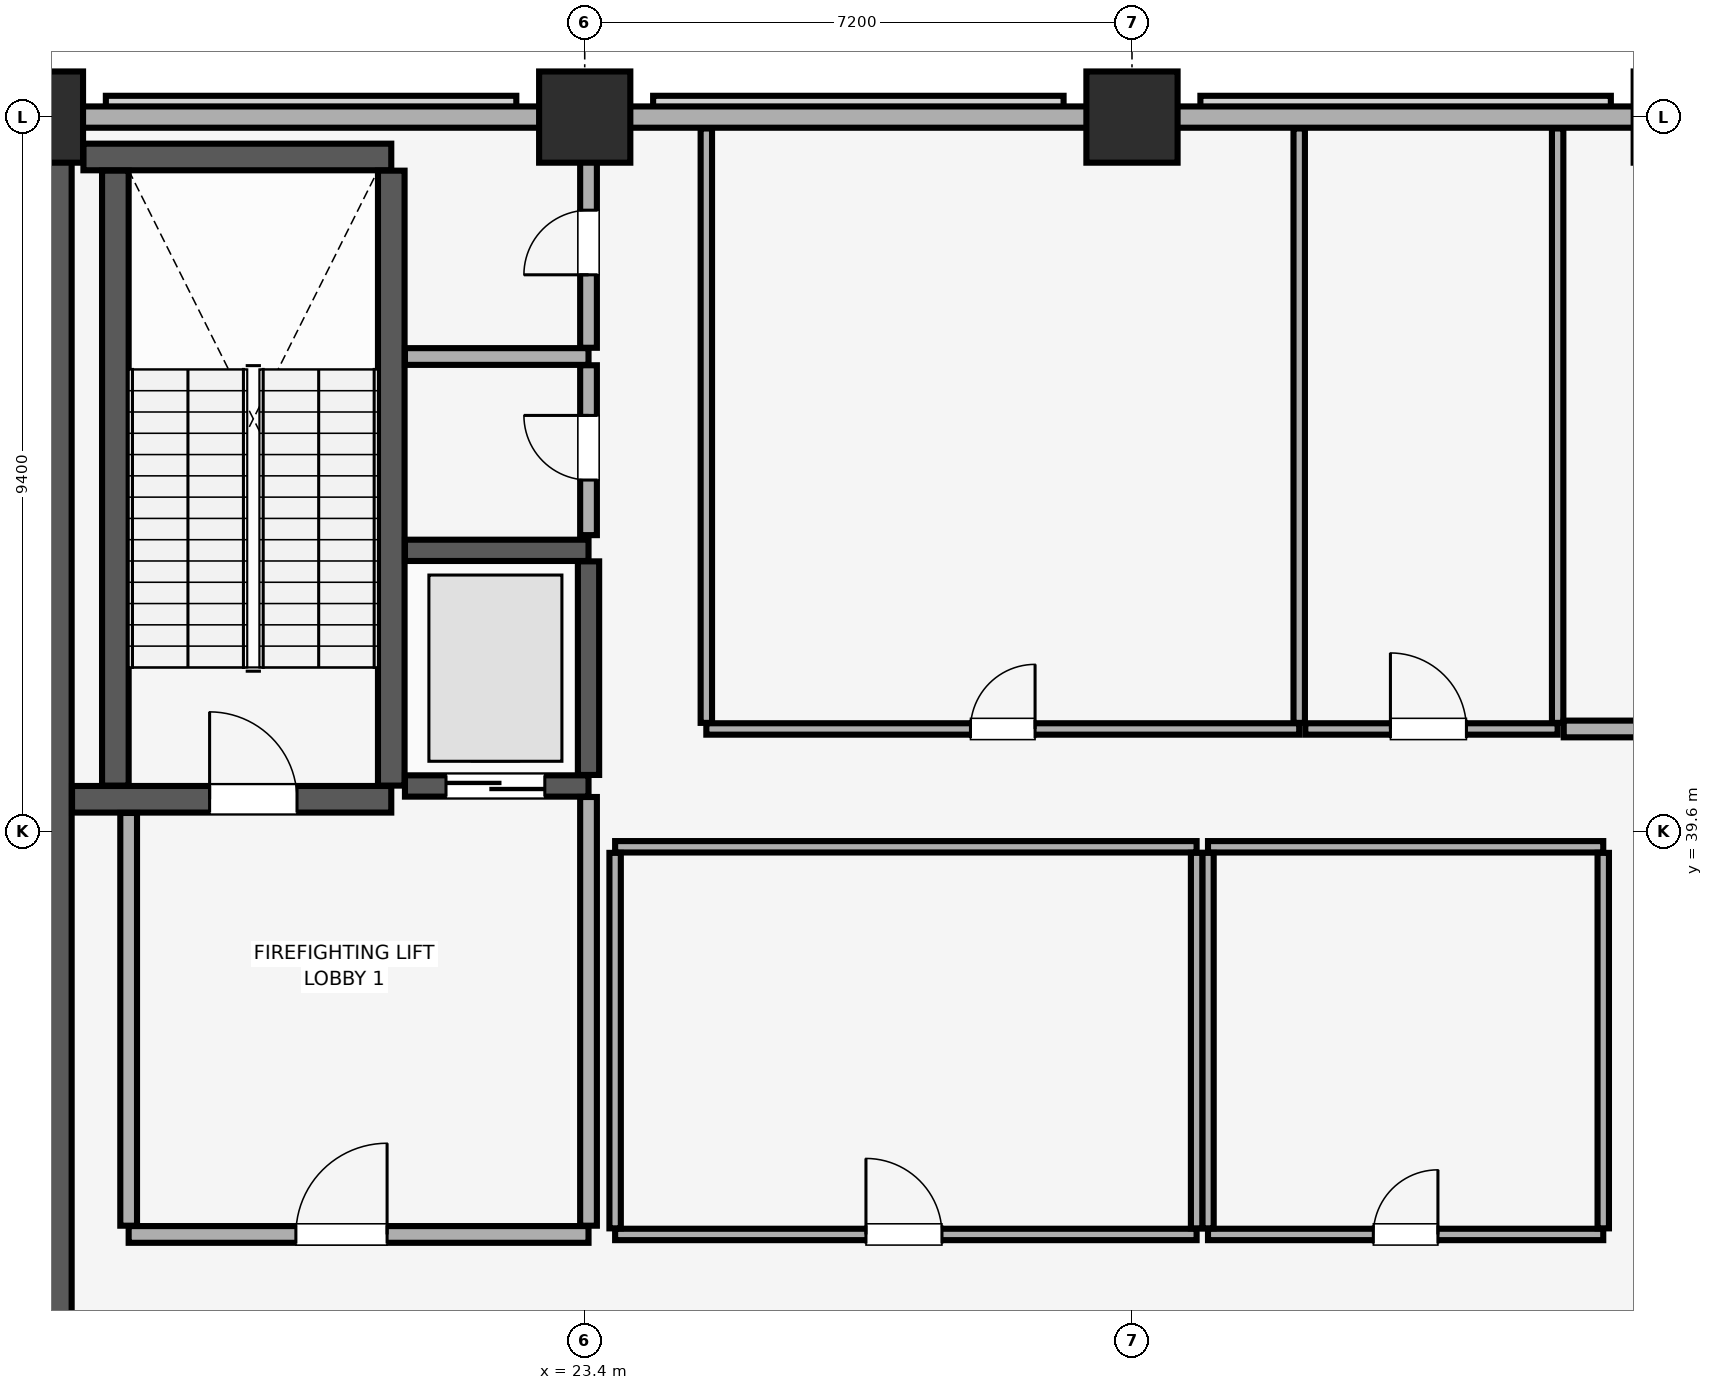
"""IFC4 building model, lengths in metres.
Left out: names, types, materials, properties, quantities, classifications, styles, units other than length and angle.
Written with IfcOpenShell. Run it as: python <this file> out.ifc"""

import sys

from ifc_helpers import new_model, si_unit, direction, frame, frame_2d, origin, origin_2d, place, context, subcontext, project, spatial, rectangle, extrude, element, fill, save


model = new_model("IFC4")
c1 = context("Model", 3, precision=1e-05, world=origin(), true_north=direction((0.0, 1.0)))
c2 = subcontext(c1, "Body", "Model", "MODEL_VIEW")
j1 = project(units=[si_unit("LENGTHUNIT", "METRE"), si_unit("PLANEANGLEUNIT", "RADIAN")], contexts=[c1])
p1 = place(None, origin())
s1 = spatial("IfcSite", under=j1, at=p1, CompositionType="ELEMENT")
p2 = place(p1, origin())
s2 = spatial("IfcBuilding", under=s1, at=p2, CompositionType="ELEMENT")
p3 = place(p2, frame((0.0, 0.0, 184.75)))
s3 = spatial("IfcBuildingStorey", under=s2, at=p3, CompositionType="ELEMENT", Elevation=184.75)
for number, where, z_axis, x_axis in (
    (1, (16.2, 49.0, 0.0), (0.0, 0.0, 1.0), (1.0, 0.0, 0.0)),
    (2, (23.4, 49.0, 0.0), (0.0, 0.0, 1.0), (1.0, 0.0, 0.0)),
    (3, (30.6, 49.0, 0.0), (0.0, 0.0, 1.0), (1.0, 0.0, 0.0)),
):
    element("IfcColumn", number, at=place(p3, frame(where, z_axis=z_axis, x_axis=x_axis)), inside=s3, PredefinedType="COLUMN", context=c2, shape_type="SweptSolid", body=[
        extrude(rectangle(XDim=1.2, YDim=1.2, at=origin_2d()), origin(), (0.0, 0.0, 1.0), 5.16),
    ])
p4 = place(p3, frame((77.0, 49.0, 0.0), z_axis=(0.0, 0.0, 1.0), x_axis=(-1.0, 0.0, 0.0)))
e4 = element("IfcWall", 4, at=p4, inside=s3, PredefinedType="SOLIDWALL", context=c2, shape_type="SweptSolid", body=[
    extrude(rectangle(XDim=70.0, YDim=0.28, at=frame_2d((35.0, 0.0))), origin(), (0.0, 0.0, 1.0), 4.36),
])
p5 = place(p3, frame((16.2, 29.4, 0.0), z_axis=(0.0, 0.0, 1.0), x_axis=(0.0, 1.0, 0.0)))
e5 = element("IfcWall", 5, at=p5, inside=s3, PredefinedType="SHEAR", context=c2, shape_type="SweptSolid", body=[
    extrude(rectangle(XDim=19.2, YDim=0.9, at=frame_2d((9.6, 0.0))), origin(), (0.0, 0.0, 1.0), 5.16),
])
p6 = place(p3, frame((16.655, 40.025, 0.0), z_axis=(0.0, 0.0, 1.0), x_axis=(1.0, 0.0, 0.0)))
e6 = element("IfcWall", 6, at=p6, inside=s3, PredefinedType="SHEAR", context=c2, shape_type="SweptSolid", body=[
    extrude(rectangle(XDim=4.2, YDim=0.35, at=frame_2d((2.1, 0.0))), origin(), (0.0, 0.0, 1.0), 5.16),
])
p7 = place(p6, frame((1.81, 0.0, 0.0)))
e7 = element("IfcOpeningElement", 7, at=p7, cuts=e6, PredefinedType="OPENING", context=c2, shape_type="SweptSolid", body=[
    extrude(rectangle(XDim=1.15, YDim=2.15, at=frame_2d((0.575, 1.075))), frame((0.0, 0.185, 0.0), z_axis=(0.0, -1.0, 0.0), x_axis=(1.0, 0.0, 0.0)), (0.0, 0.0, 1.0), 0.37),
])
p8 = place(p3, frame((16.805, 48.475, 0.0), z_axis=(0.0, 0.0, 1.0), x_axis=(1.0, 0.0, 0.0)))
e8 = element("IfcWall", 8, at=p8, inside=s3, PredefinedType="SHEAR", context=c2, shape_type="SweptSolid", body=[
    extrude(rectangle(XDim=4.05, YDim=0.35, at=frame_2d((2.025, 0.0))), origin(), (0.0, 0.0, 1.0), 5.16),
])
for number, where, z_axis, x_axis in (
    (9, (17.225, 40.205, 0.0), (0.0, 0.0, 1.0), (0.0, 1.0, 0.0)),
    (10, (20.855, 40.205, 0.0), (0.0, 0.0, 1.0), (0.0, 1.0, 0.0)),
):
    element("IfcWall", number, at=place(p3, frame(where, z_axis=z_axis, x_axis=x_axis)), inside=s3, PredefinedType="SHEAR", context=c2, shape_type="SweptSolid", body=[
        extrude(rectangle(XDim=8.09, YDim=0.35, at=frame_2d((4.045, 0.0))), origin(), (0.0, 0.0, 1.0), 5.16),
    ])
p9 = place(p3, frame((21.035, 40.2, 0.0), z_axis=(0.0, 0.0, 1.0), x_axis=(1.0, 0.0, 0.0)))
e11 = element("IfcWall", 11, at=p9, inside=s3, PredefinedType="SHEAR", context=c2, shape_type="SweptSolid", body=[
    extrude(rectangle(XDim=2.415, YDim=0.28, at=frame_2d((1.208, 0.0))), origin(), (0.0, 0.0, 1.0), 5.16),
])
p10 = place(p9, frame((0.54, 0.0, 0.0)))
e12 = element("IfcOpeningElement", 12, at=p10, cuts=e11, PredefinedType="OPENING", context=c2, shape_type="SweptSolid", body=[
    extrude(rectangle(XDim=1.3, YDim=2.3, at=frame_2d((0.65, 1.15))), frame((0.0, 0.15, 0.0), z_axis=(0.0, -1.0, 0.0), x_axis=(1.0, 0.0, 0.0)), (0.0, 0.0, 1.0), 0.3),
])
p11 = place(p3, frame((21.035, 43.3, 0.0), z_axis=(0.0, 0.0, 1.0), x_axis=(1.0, 0.0, 0.0)))
e13 = element("IfcWall", 13, at=p11, inside=s3, PredefinedType="SHEAR", context=c2, shape_type="SweptSolid", body=[
    extrude(rectangle(XDim=2.415, YDim=0.28, at=frame_2d((1.208, 0.0))), origin(), (0.0, 0.0, 1.0), 5.16),
])
p12 = place(p3, frame((23.45, 40.345, 0.0), z_axis=(0.0, 0.0, 1.0), x_axis=(0.0, 1.0, 0.0)))
e14 = element("IfcWall", 14, at=p12, inside=s3, PredefinedType="SHEAR", context=c2, shape_type="SweptSolid", body=[
    extrude(rectangle(XDim=2.81, YDim=0.28, at=frame_2d((1.405, 0.0))), origin(), (0.0, 0.0, 1.0), 5.16),
])
p13 = place(p3, frame((17.4, 34.3, 0.0), z_axis=(0.0, 0.0, 1.0), x_axis=(1.0, 0.0, 0.0)))
e15 = element("IfcWall", 15, at=p13, inside=s3, PredefinedType="PARTITIONING", context=c2, shape_type="SweptSolid", body=[
    extrude(rectangle(XDim=6.05, YDim=0.22, at=frame_2d((3.025, 0.0))), origin(), (0.0, 0.0, 1.0), 5.16),
])
p14 = place(p13, frame((2.2, 0.0, 0.0)))
e16 = element("IfcOpeningElement", 16, at=p14, cuts=e15, PredefinedType="OPENING", context=c2, shape_type="SweptSolid", body=[
    extrude(rectangle(XDim=1.2, YDim=2.15, at=frame_2d((0.6, 1.075))), frame((0.0, 0.12, 0.0), z_axis=(0.0, -1.0, 0.0), x_axis=(1.0, 0.0, 0.0)), (0.0, 0.0, 1.0), 0.24),
])
p15 = place(p3, frame((17.4, 34.415, 0.0), z_axis=(0.0, 0.0, 1.0), x_axis=(0.0, 1.0, 0.0)))
e17 = element("IfcWall", 17, at=p15, inside=s3, PredefinedType="PARTITIONING", context=c2, shape_type="SweptSolid", body=[
    extrude(rectangle(XDim=5.43, YDim=0.22, at=frame_2d((2.715, 0.0))), origin(), (0.0, 0.0, 1.0), 5.16),
])
p16 = place(p3, frame((23.45, 34.415, 0.0), z_axis=(0.0, 0.0, 1.0), x_axis=(0.0, 1.0, 0.0)))
e18 = element("IfcWall", 18, at=p16, inside=s3, PredefinedType="PARTITIONING", context=c2, shape_type="SweptSolid", body=[
    extrude(rectangle(XDim=5.64, YDim=0.22, at=frame_2d((2.82, 0.0))), origin(), (0.0, 0.0, 1.0), 5.16),
])
p17 = place(p3, frame((21.035, 45.85, 0.0), z_axis=(0.0, 0.0, 1.0), x_axis=(1.0, 0.0, 0.0)))
e19 = element("IfcWall", 19, at=p17, inside=s3, PredefinedType="PARTITIONING", context=c2, shape_type="SweptSolid", body=[
    extrude(rectangle(XDim=2.415, YDim=0.22, at=frame_2d((1.208, 0.0))), origin(), (0.0, 0.0, 1.0), 5.16),
])
p18 = place(p3, frame((23.45, 43.5, 0.0), z_axis=(0.0, 0.0, 1.0), x_axis=(0.0, 1.0, 0.0)))
e20 = element("IfcWall", 20, at=p18, inside=s3, PredefinedType="PARTITIONING", context=c2, shape_type="SweptSolid", body=[
    extrude(rectangle(XDim=2.235, YDim=0.22, at=frame_2d((1.118, 0.0))), origin(), (0.0, 0.0, 1.0), 5.16),
])
p19 = place(p18, frame((0.725, 0.0, 0.0)))
e21 = element("IfcOpeningElement", 21, at=p19, cuts=e20, PredefinedType="OPENING", context=c2, shape_type="SweptSolid", body=[
    extrude(rectangle(XDim=0.85, YDim=2.1, at=frame_2d((0.425, 1.05))), frame((0.0, 0.12, 0.0), z_axis=(0.0, -1.0, 0.0), x_axis=(1.0, 0.0, 0.0)), (0.0, 0.0, 1.0), 0.24),
])
p20 = place(p3, frame((23.45, 45.965, 0.0), z_axis=(0.0, 0.0, 1.0), x_axis=(0.0, 1.0, 0.0)))
e22 = element("IfcWall", 22, at=p20, inside=s3, PredefinedType="PARTITIONING", context=c2, shape_type="SweptSolid", body=[
    extrude(rectangle(XDim=2.885, YDim=0.22, at=frame_2d((1.442, 0.0))), origin(), (0.0, 0.0, 1.0), 5.16),
])
p21 = place(p20, frame((0.96, 0.0, 0.0)))
e23 = element("IfcOpeningElement", 23, at=p21, cuts=e22, PredefinedType="OPENING", context=c2, shape_type="SweptSolid", body=[
    extrude(rectangle(XDim=0.85, YDim=2.1, at=frame_2d((0.425, 1.05))), frame((0.0, 0.12, 0.0), z_axis=(0.0, -1.0, 0.0), x_axis=(1.0, 0.0, 0.0)), (0.0, 0.0, 1.0), 0.24),
])
p22 = place(p3, frame((31.6, 34.3, 0.0), z_axis=(0.0, 0.0, 1.0), x_axis=(1.0, 0.0, 0.0)))
e24 = element("IfcWall", 24, at=p22, inside=s3, PredefinedType="PARTITIONING", context=c2, shape_type="SweptSolid", body=[
    extrude(rectangle(XDim=5.2, YDim=0.15, at=frame_2d((2.6, 0.0))), origin(), (0.0, 0.0, 1.0), 5.16),
])
p23 = place(p22, frame((2.175, 0.0, 0.0)))
e25 = element("IfcOpeningElement", 25, at=p23, cuts=e24, PredefinedType="OPENING", context=c2, shape_type="SweptSolid", body=[
    extrude(rectangle(XDim=0.85, YDim=2.1, at=frame_2d((0.425, 1.05))), frame((0.0, 0.085, 0.0), z_axis=(0.0, -1.0, 0.0), x_axis=(1.0, 0.0, 0.0)), (0.0, 0.0, 1.0), 0.17),
])
p24 = place(p3, frame((31.6, 39.4, 0.0), z_axis=(0.0, 0.0, 1.0), x_axis=(1.0, 0.0, 0.0)))
e26 = element("IfcWall", 26, at=p24, inside=s3, PredefinedType="PARTITIONING", context=c2, shape_type="SweptSolid", body=[
    extrude(rectangle(XDim=5.2, YDim=0.15, at=frame_2d((2.6, 0.0))), origin(), (0.0, 0.0, 1.0), 5.16),
])
for number, where, z_axis, x_axis in (
    (27, (31.6, 34.38, 0.0), (0.0, 0.0, 1.0), (0.0, 1.0, 0.0)),
    (28, (36.8, 34.38, 0.0), (0.0, 0.0, 1.0), (0.0, 1.0, 0.0)),
):
    element("IfcWall", number, at=place(p3, frame(where, z_axis=z_axis, x_axis=x_axis)), inside=s3, PredefinedType="PARTITIONING", context=c2, shape_type="SweptSolid", body=[
        extrude(rectangle(XDim=4.94, YDim=0.15, at=frame_2d((2.47, 0.0))), origin(), (0.0, 0.0, 1.0), 5.16),
    ])
p25 = place(p3, frame((23.8, 34.3, 0.0), z_axis=(0.0, 0.0, 1.0), x_axis=(1.0, 0.0, 0.0)))
e29 = element("IfcWall", 29, at=p25, inside=s3, PredefinedType="PARTITIONING", context=c2, shape_type="SweptSolid", body=[
    extrude(rectangle(XDim=7.65, YDim=0.15, at=frame_2d((3.825, 0.0))), origin(), (0.0, 0.0, 1.0), 5.16),
])
p26 = place(p25, frame((3.3, 0.0, 0.0)))
e30 = element("IfcOpeningElement", 30, at=p26, cuts=e29, PredefinedType="OPENING", context=c2, shape_type="SweptSolid", body=[
    extrude(rectangle(XDim=1.0, YDim=2.15, at=frame_2d((0.5, 1.075))), frame((0.0, 0.085, 0.0), z_axis=(0.0, -1.0, 0.0), x_axis=(1.0, 0.0, 0.0)), (0.0, 0.0, 1.0), 0.17),
])
p27 = place(p3, frame((23.8, 39.4, 0.0), z_axis=(0.0, 0.0, 1.0), x_axis=(1.0, 0.0, 0.0)))
e31 = element("IfcWall", 31, at=p27, inside=s3, PredefinedType="PARTITIONING", context=c2, shape_type="SweptSolid", body=[
    extrude(rectangle(XDim=7.65, YDim=0.15, at=frame_2d((3.825, 0.0))), origin(), (0.0, 0.0, 1.0), 5.16),
])
for number, where, z_axis, x_axis in (
    (32, (23.8, 34.38, 0.0), (0.0, 0.0, 1.0), (0.0, 1.0, 0.0)),
    (33, (31.45, 34.38, 0.0), (0.0, 0.0, 1.0), (0.0, 1.0, 0.0)),
):
    element("IfcWall", number, at=place(p3, frame(where, z_axis=z_axis, x_axis=x_axis)), inside=s3, PredefinedType="PARTITIONING", context=c2, shape_type="SweptSolid", body=[
        extrude(rectangle(XDim=4.94, YDim=0.15, at=frame_2d((2.47, 0.0))), origin(), (0.0, 0.0, 1.0), 5.16),
    ])
p28 = place(p3, frame((25.0, 40.95, 0.0), z_axis=(0.0, 0.0, 1.0), x_axis=(1.0, 0.0, 0.0)))
e34 = element("IfcWall", 34, at=p28, inside=s3, PredefinedType="PARTITIONING", context=c2, shape_type="SweptSolid", body=[
    extrude(rectangle(XDim=7.8, YDim=0.15, at=frame_2d((3.9, 0.0))), origin(), (0.0, 0.0, 1.0), 5.16),
])
p29 = place(p28, frame((3.475, 0.0, 0.0)))
e35 = element("IfcOpeningElement", 35, at=p29, cuts=e34, PredefinedType="OPENING", context=c2, shape_type="SweptSolid", body=[
    extrude(rectangle(XDim=0.85, YDim=2.1, at=frame_2d((0.425, 1.05))), frame((0.0, 0.085, 0.0), z_axis=(0.0, -1.0, 0.0), x_axis=(1.0, 0.0, 0.0)), (0.0, 0.0, 1.0), 0.17),
])
for number, where, z_axis, x_axis in (
    (36, (25.0, 41.03, 0.0), (0.0, 0.0, 1.0), (0.0, 1.0, 0.0)),
    (37, (32.8, 41.03, 0.0), (0.0, 0.0, 1.0), (0.0, 1.0, 0.0)),
):
    element("IfcWall", number, at=place(p3, frame(where, z_axis=z_axis, x_axis=x_axis)), inside=s3, PredefinedType="PARTITIONING", context=c2, shape_type="SweptSolid", body=[
        extrude(rectangle(XDim=7.82, YDim=0.15, at=frame_2d((3.91, 0.0))), origin(), (0.0, 0.0, 1.0), 5.16),
    ])
p30 = place(p3, frame((32.88, 40.95, 0.0), z_axis=(0.0, 0.0, 1.0), x_axis=(1.0, 0.0, 0.0)))
e38 = element("IfcWall", 38, at=p30, inside=s3, PredefinedType="PARTITIONING", context=c2, shape_type="SweptSolid", body=[
    extrude(rectangle(XDim=3.32, YDim=0.15, at=frame_2d((1.66, 0.0))), origin(), (0.0, 0.0, 1.0), 5.16),
])
p31 = place(p30, frame((1.12, 0.0, 0.0)))
e39 = element("IfcOpeningElement", 39, at=p31, cuts=e38, PredefinedType="OPENING", context=c2, shape_type="SweptSolid", body=[
    extrude(rectangle(XDim=1.0, YDim=2.15, at=frame_2d((0.5, 1.075))), frame((0.0, 0.085, 0.0), z_axis=(0.0, -1.0, 0.0), x_axis=(1.0, 0.0, 0.0)), (0.0, 0.0, 1.0), 0.17),
])
p32 = place(p3, frame((36.2, 41.03, 0.0), z_axis=(0.0, 0.0, 1.0), x_axis=(0.0, 1.0, 0.0)))
e40 = element("IfcWall", 40, at=p32, inside=s3, PredefinedType="PARTITIONING", context=c2, shape_type="SweptSolid", body=[
    extrude(rectangle(XDim=7.82, YDim=0.15, at=frame_2d((3.91, 0.0))), origin(), (0.0, 0.0, 1.0), 5.16),
])
p33 = place(p3, frame((36.28, 40.95, 0.0), z_axis=(0.0, 0.0, 1.0), x_axis=(1.0, 0.0, 0.0)))
e41 = element("IfcWall", 41, at=p33, inside=s3, PredefinedType="PARTITIONING", context=c2, shape_type="SweptSolid", body=[
    extrude(rectangle(XDim=3.42, YDim=0.22, at=frame_2d((1.71, 0.0))), origin(), (0.0, 0.0, 1.0), 5.16),
])
p34 = place(p33, frame((2.245, 0.0, 0.0)))
e42 = element("IfcOpeningElement", 42, at=p34, cuts=e41, PredefinedType="OPENING", context=c2, shape_type="SweptSolid", body=[
    extrude(rectangle(XDim=0.85, YDim=2.1, at=frame_2d((0.425, 1.05))), frame((0.0, 0.12, 0.0), z_axis=(0.0, -1.0, 0.0), x_axis=(1.0, 0.0, 0.0)), (0.0, 0.0, 1.0), 0.24),
])
p35 = place(p7, origin())
e43 = element("IfcDoor", 43, at=p35, inside=s3, OperationType="SINGLE_SWING_LEFT", PredefinedType="DOOR", context=c2, shape_type="SweptSolid", body=[
    extrude(rectangle(XDim=1.15, YDim=2.15, at=frame_2d((0.575, 1.075))), frame((0.0, 0.025, 0.0), z_axis=(0.0, -1.0, 0.0), x_axis=(1.0, 0.0, 0.0)), (0.0, 0.0, 1.0), 0.05),
])
fill(e7, e43)
p36 = place(p10, origin())
e44 = element("IfcDoor", 44, at=p36, inside=s3, OperationType="DOUBLE_DOOR_SLIDING", PredefinedType="DOOR", context=c2, shape_type="SweptSolid", body=[
    extrude(rectangle(XDim=1.3, YDim=2.3, at=frame_2d((0.65, 1.15))), frame((0.0, 0.025, 0.0), z_axis=(0.0, -1.0, 0.0), x_axis=(1.0, 0.0, 0.0)), (0.0, 0.0, 1.0), 0.05),
])
fill(e12, e44)
p37 = place(p14, origin())
e45 = element("IfcDoor", 45, at=p37, inside=s3, OperationType="SINGLE_SWING_RIGHT", PredefinedType="DOOR", context=c2, shape_type="SweptSolid", body=[
    extrude(rectangle(XDim=1.2, YDim=2.15, at=frame_2d((0.6, 1.075))), frame((0.0, 0.025, 0.0), z_axis=(0.0, -1.0, 0.0), x_axis=(1.0, 0.0, 0.0)), (0.0, 0.0, 1.0), 0.05),
])
fill(e16, e45)
p38 = place(p19, origin())
e46 = element("IfcDoor", 46, at=p38, inside=s3, OperationType="SINGLE_SWING_RIGHT", PredefinedType="DOOR", context=c2, shape_type="SweptSolid", body=[
    extrude(rectangle(XDim=0.85, YDim=2.1, at=frame_2d((0.425, 1.05))), frame((0.0, 0.025, 0.0), z_axis=(0.0, -1.0, 0.0), x_axis=(1.0, 0.0, 0.0)), (0.0, 0.0, 1.0), 0.05),
])
fill(e21, e46)
p39 = place(p21, origin())
e47 = element("IfcDoor", 47, at=p39, inside=s3, OperationType="SINGLE_SWING_LEFT", PredefinedType="DOOR", context=c2, shape_type="SweptSolid", body=[
    extrude(rectangle(XDim=0.85, YDim=2.1, at=frame_2d((0.425, 1.05))), frame((0.0, 0.025, 0.0), z_axis=(0.0, -1.0, 0.0), x_axis=(1.0, 0.0, 0.0)), (0.0, 0.0, 1.0), 0.05),
])
fill(e23, e47)
p40 = place(p23, origin())
e48 = element("IfcDoor", 48, at=p40, inside=s3, OperationType="SINGLE_SWING_RIGHT", PredefinedType="DOOR", context=c2, shape_type="SweptSolid", body=[
    extrude(rectangle(XDim=0.85, YDim=2.1, at=frame_2d((0.425, 1.05))), frame((0.0, 0.025, 0.0), z_axis=(0.0, -1.0, 0.0), x_axis=(1.0, 0.0, 0.0)), (0.0, 0.0, 1.0), 0.05),
])
fill(e25, e48)
p41 = place(p26, origin())
e49 = element("IfcDoor", 49, at=p41, inside=s3, OperationType="SINGLE_SWING_LEFT", PredefinedType="DOOR", context=c2, shape_type="SweptSolid", body=[
    extrude(rectangle(XDim=1.0, YDim=2.15, at=frame_2d((0.5, 1.075))), frame((0.0, 0.025, 0.0), z_axis=(0.0, -1.0, 0.0), x_axis=(1.0, 0.0, 0.0)), (0.0, 0.0, 1.0), 0.05),
])
fill(e30, e49)
p42 = place(p29, origin())
e50 = element("IfcDoor", 50, at=p42, inside=s3, OperationType="SINGLE_SWING_RIGHT", PredefinedType="DOOR", context=c2, shape_type="SweptSolid", body=[
    extrude(rectangle(XDim=0.85, YDim=2.1, at=frame_2d((0.425, 1.05))), frame((0.0, 0.025, 0.0), z_axis=(0.0, -1.0, 0.0), x_axis=(1.0, 0.0, 0.0)), (0.0, 0.0, 1.0), 0.05),
])
fill(e35, e50)
p43 = place(p31, origin())
e51 = element("IfcDoor", 51, at=p43, inside=s3, OperationType="SINGLE_SWING_LEFT", PredefinedType="DOOR", context=c2, shape_type="SweptSolid", body=[
    extrude(rectangle(XDim=1.0, YDim=2.15, at=frame_2d((0.5, 1.075))), frame((0.0, 0.025, 0.0), z_axis=(0.0, -1.0, 0.0), x_axis=(1.0, 0.0, 0.0)), (0.0, 0.0, 1.0), 0.05),
])
fill(e39, e51)
save(model, sys.argv[1])
